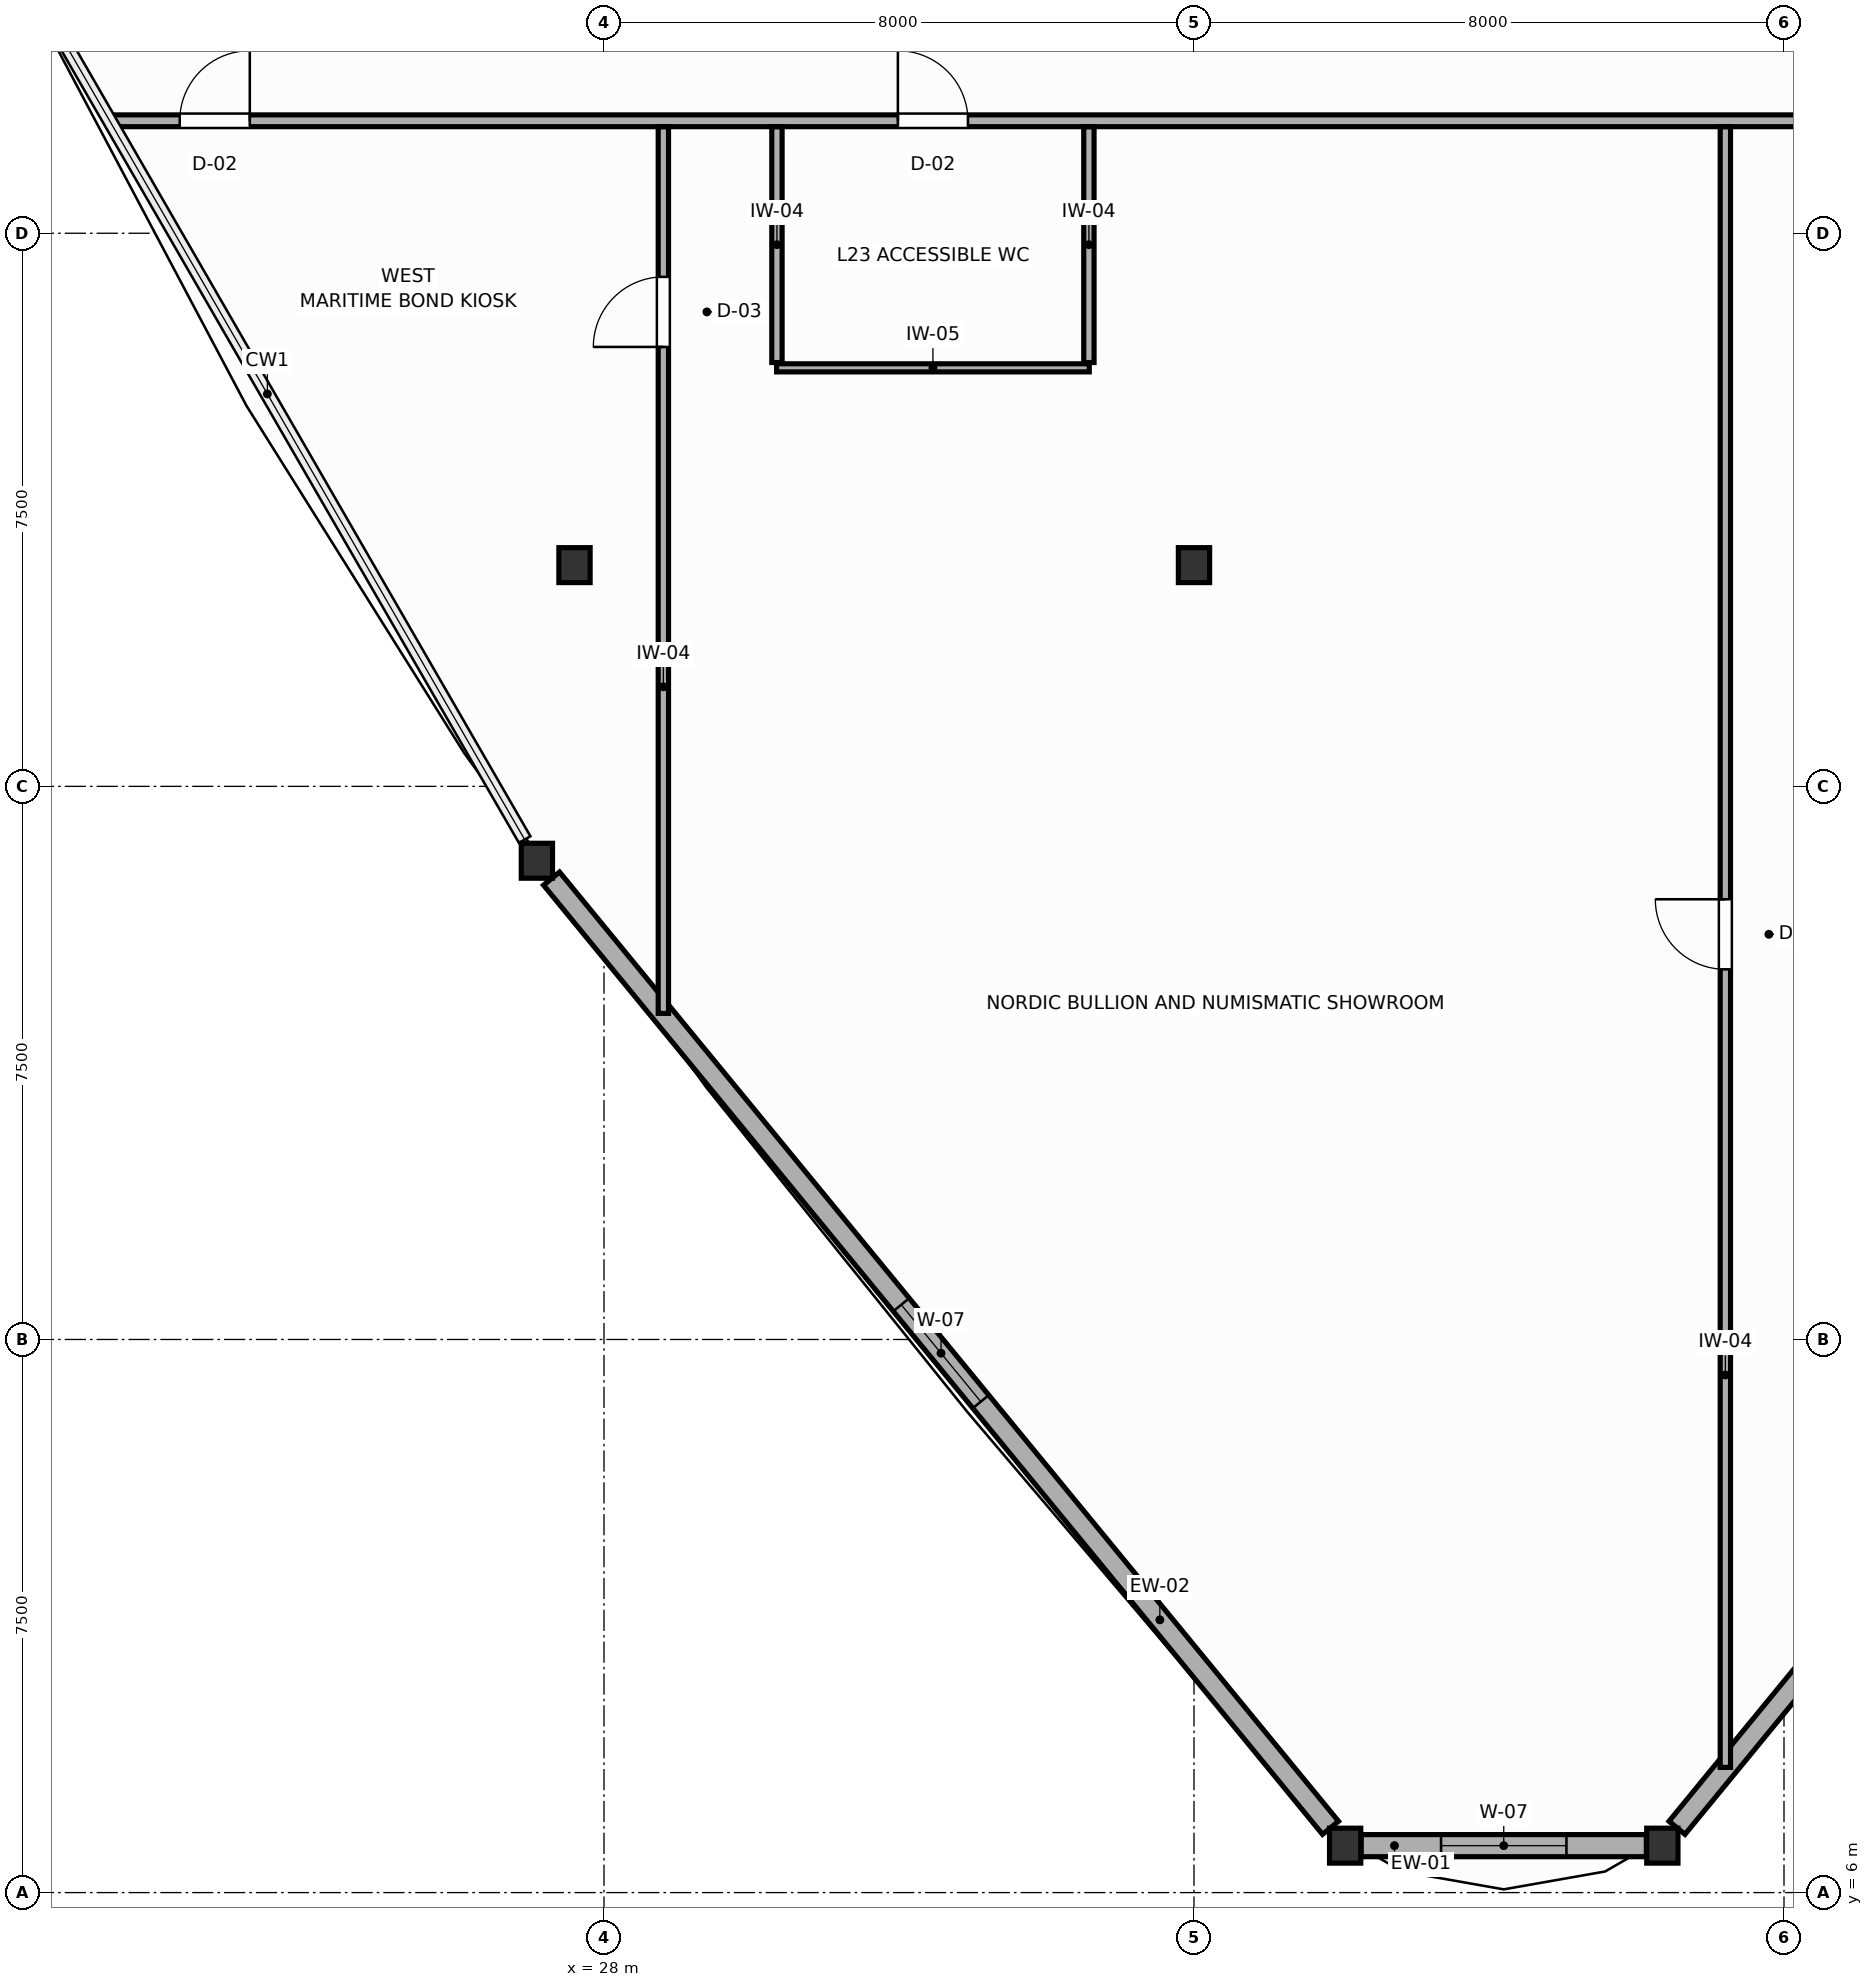
"""IFC4 building model, lengths in metres.
Left out: names, types, materials, properties, quantities, classifications, styles, units other than length and angle.
Written with IfcOpenShell. Run it as: python <this file> out.ifc"""

import sys

from ifc_helpers import new_model, si_unit, direction, frame, frame_2d, origin, origin_2d, place, context, subcontext, project, spatial, rectangle, i_section, extrude, source, transform, mapped, element, fill, save


model = new_model("IFC4")
c1 = context("Model", 3, precision=1e-05, world=origin(), true_north=direction((0.0, 1.0)))
c2 = subcontext(c1, "Body", "Model", "MODEL_VIEW")
j1 = project(units=[si_unit("LENGTHUNIT", "METRE"), si_unit("PLANEANGLEUNIT", "RADIAN")], contexts=[c1])
p1 = place(None, origin())
s1 = spatial("IfcSite", under=j1, at=p1, CompositionType="ELEMENT")
p2 = place(p1, origin())
s2 = spatial("IfcBuilding", under=s1, at=p2, CompositionType="ELEMENT")
p3 = place(p2, frame((0.0, 0.0, 95.1)))
s3 = spatial("IfcBuildingStorey", under=s2, at=p3, CompositionType="ELEMENT", Elevation=95.1)
m1 = source(origin(), c2, "Body", "SweptSolid", [
    extrude(i_section(OverallWidth=0.424, OverallDepth=0.474, WebThickness=0.045, FlangeThickness=0.072, FilletRadius=0.015, at=origin_2d()), origin(), (0.0, 0.0, 1.0), 3.9),
])
for number, where, z_axis, x_axis in (
    (1, (27.6, 24.0, 0.0), (0.0, 0.0, 1.0), (1.0, 0.0, 0.0)),
    (2, (36.0, 24.0, 0.0), (0.0, 0.0, 1.0), (1.0, 0.0, 0.0)),
    (3, (27.09, 19.991, 0.0), (0.0, 0.0, 1.0), (1.0, 0.0, 0.0)),
    (4, (38.05, 6.636, 0.0), (0.0, 0.0, 1.0), (1.0, 0.0, 0.0)),
    (5, (42.351, 6.636, 0.0), (0.0, 0.0, 1.0), (1.0, 0.0, 0.0)),
):
    element("IfcColumn", number, at=place(p3, frame(where, z_axis=z_axis, x_axis=x_axis)), inside=s3, PredefinedType="COLUMN", context=c2, shape_type="MappedRepresentation", body=[
        mapped(m1, transform((0.0, 0.0, 0.0), scale=1.0)),
    ])
p4 = place(p3, frame((27.289, 19.749, 0.0), z_axis=(0.0, 0.0, 1.0), x_axis=(0.634363798099, -0.77303465101, 0.0)))
e6 = element("IfcWall", 6, at=p4, inside=s3, PredefinedType="SOLIDWALL", context=c2, shape_type="SweptSolid", body=[
    extrude(rectangle(XDim=16.65, YDim=0.28, at=frame_2d((8.325, 0.0))), origin(), (0.0, 0.0, 1.0), 2.07),
])
p5 = place(p4, frame((7.475, 0.0, 0.75)))
e7 = element("IfcOpeningElement", 7, at=p5, cuts=e6, PredefinedType="OPENING", context=c2, shape_type="SweptSolid", body=[
    extrude(rectangle(XDim=1.7, YDim=1.1, at=frame_2d((0.85, 0.55))), frame((0.0, 0.15, 0.0), z_axis=(0.0, -1.0, 0.0), x_axis=(1.0, 0.0, 0.0)), (0.0, 0.0, 1.0), 0.3),
])
p6 = place(p3, frame((38.267, 6.636, 0.0), z_axis=(0.0, 0.0, 1.0), x_axis=(1.0, 0.0, 0.0)))
e8 = element("IfcWall", 8, at=p6, inside=s3, PredefinedType="SOLIDWALL", context=c2, shape_type="SweptSolid", body=[
    extrude(rectangle(XDim=3.867, YDim=0.3, at=frame_2d((1.934, 0.0))), origin(), (0.0, 0.0, 1.0), 2.07),
])
p7 = place(p6, frame((1.083, 0.0, 0.75)))
e9 = element("IfcOpeningElement", 9, at=p7, cuts=e8, PredefinedType="OPENING", context=c2, shape_type="SweptSolid", body=[
    extrude(rectangle(XDim=1.7, YDim=1.1, at=frame_2d((0.85, 0.55))), frame((0.0, 0.16, 0.0), z_axis=(0.0, -1.0, 0.0), x_axis=(1.0, 0.0, 0.0)), (0.0, 0.0, 1.0), 0.32),
])
p8 = place(p3, frame((42.549, 6.878, 0.0), z_axis=(0.0, 0.0, 1.0), x_axis=(0.634372560511, 0.77302746036, 0.0)))
e10 = element("IfcWall", 10, at=p8, inside=s3, PredefinedType="SOLIDWALL", context=c2, shape_type="SweptSolid", body=[
    extrude(rectangle(XDim=16.65, YDim=0.28, at=frame_2d((8.325, 0.0))), origin(), (0.0, 0.0, 1.0), 2.07),
])
p9 = place(p8, frame((7.475, 0.0, 0.75)))
e11 = element("IfcOpeningElement", 11, at=p9, cuts=e10, PredefinedType="OPENING", context=c2, shape_type="SweptSolid", body=[
    extrude(rectangle(XDim=1.7, YDim=1.1, at=frame_2d((0.85, 0.55))), frame((0.0, 0.15, 0.0), z_axis=(0.0, -1.0, 0.0), x_axis=(1.0, 0.0, 0.0)), (0.0, 0.0, 1.0), 0.3),
])
p10 = place(p3, frame((21.317, 30.025, 0.0), z_axis=(0.0, 0.0, 1.0), x_axis=(1.0, 0.0, 0.0)))
e12 = element("IfcWall", 12, at=p10, inside=s3, PredefinedType="PARTITIONING", context=c2, shape_type="SweptSolid", body=[
    extrude(rectangle(XDim=37.766, YDim=0.16, at=frame_2d((18.883, 0.0))), origin(), (0.0, 0.0, 1.0), 3.7),
])
p11 = place(p10, frame((10.668, 0.0, 0.0)))
e13 = element("IfcOpeningElement", 13, at=p11, cuts=e12, PredefinedType="OPENING", context=c2, shape_type="SweptSolid", body=[
    extrude(rectangle(XDim=0.95, YDim=2.05, at=frame_2d((0.475, 1.025))), frame((0.0, 0.09, 0.0), z_axis=(0.0, -1.0, 0.0), x_axis=(1.0, 0.0, 0.0)), (0.0, 0.0, 1.0), 0.18),
])
p12 = place(p10, frame((0.93, 0.0, 0.0)))
e14 = element("IfcOpeningElement", 14, at=p12, cuts=e12, PredefinedType="OPENING", context=c2, shape_type="SweptSolid", body=[
    extrude(rectangle(XDim=0.95, YDim=2.05, at=frame_2d((0.475, 1.025))), frame((0.0, 0.09, 0.0), z_axis=(0.0, -1.0, 0.0), x_axis=(1.0, 0.0, 0.0)), (0.0, 0.0, 1.0), 0.18),
])
p13 = place(p3, frame((43.205, 7.698, 0.0), z_axis=(0.0, 0.0, 1.0), x_axis=(0.0, 1.0, 0.0)))
e15 = element("IfcWall", 15, at=p13, inside=s3, PredefinedType="PARTITIONING", context=c2, shape_type="SweptSolid", body=[
    extrude(rectangle(XDim=22.246, YDim=0.14, at=frame_2d((11.123, 0.0))), origin(), (0.0, 0.0, 1.0), 2.23),
])
p14 = place(p13, frame((10.821, 0.0, 0.0)))
e16 = element("IfcOpeningElement", 16, at=p14, cuts=e15, PredefinedType="OPENING", context=c2, shape_type="SweptSolid", body=[
    extrude(rectangle(XDim=0.95, YDim=2.05, at=frame_2d((0.475, 1.025))), frame((0.0, 0.08, 0.0), z_axis=(0.0, -1.0, 0.0), x_axis=(1.0, 0.0, 0.0)), (0.0, 0.0, 1.0), 0.16),
])
p15 = place(p3, frame((28.805, 17.921, 0.0), z_axis=(0.0, 0.0, 1.0), x_axis=(0.0, 1.0, 0.0)))
e17 = element("IfcWall", 17, at=p15, inside=s3, PredefinedType="PARTITIONING", context=c2, shape_type="SweptSolid", body=[
    extrude(rectangle(XDim=12.022, YDim=0.14, at=frame_2d((6.011, 0.0))), origin(), (0.0, 0.0, 1.0), 3.7),
])
p16 = place(p15, frame((9.037, 0.0, 0.0)))
e18 = element("IfcOpeningElement", 18, at=p16, cuts=e17, PredefinedType="OPENING", context=c2, shape_type="SweptSolid", body=[
    extrude(rectangle(XDim=0.95, YDim=2.05, at=frame_2d((0.475, 1.025))), frame((0.0, 0.08, 0.0), z_axis=(0.0, -1.0, 0.0), x_axis=(1.0, 0.0, 0.0)), (0.0, 0.0, 1.0), 0.16),
])
p17 = place(p3, frame((30.34, 26.675, 0.0), z_axis=(0.0, 0.0, 1.0), x_axis=(1.0, 0.0, 0.0)))
e19 = element("IfcWall", 19, at=p17, inside=s3, PredefinedType="MOVABLE", context=c2, shape_type="SweptSolid", body=[
    extrude(rectangle(XDim=4.24, YDim=0.11, at=frame_2d((2.12, 0.0))), origin(), (0.0, 0.0, 1.0), 3.7),
])
for number, where, z_axis, x_axis in (
    (20, (34.575, 26.747, 0.0), (0.0, 0.0, 1.0), (0.0, 1.0, 0.0)),
    (21, (30.345, 26.747, 0.0), (0.0, 0.0, 1.0), (0.0, 1.0, 0.0)),
):
    element("IfcWall", number, at=place(p3, frame(where, z_axis=z_axis, x_axis=x_axis)), inside=s3, PredefinedType="PARTITIONING", context=c2, shape_type="SweptSolid", body=[
        extrude(rectangle(XDim=3.196, YDim=0.14, at=frame_2d((1.598, 0.0))), origin(), (0.0, 0.0, 1.0), 3.7),
    ])
p18 = place(p5, origin())
e22 = element("IfcWindow", 22, at=p18, inside=s3, PartitioningType="SINGLE_PANEL", PredefinedType="WINDOW", context=c2, shape_type="SweptSolid", body=[
    extrude(rectangle(XDim=1.7, YDim=1.1, at=frame_2d((0.85, 0.55))), frame((0.0, 0.03, 0.0), z_axis=(0.0, -1.0, 0.0), x_axis=(1.0, 0.0, 0.0)), (0.0, 0.0, 1.0), 0.06),
])
fill(e7, e22)
p19 = place(p7, origin())
e23 = element("IfcWindow", 23, at=p19, inside=s3, PartitioningType="SINGLE_PANEL", PredefinedType="WINDOW", context=c2, shape_type="SweptSolid", body=[
    extrude(rectangle(XDim=1.7, YDim=1.1, at=frame_2d((0.85, 0.55))), frame((0.0, 0.03, 0.0), z_axis=(0.0, -1.0, 0.0), x_axis=(1.0, 0.0, 0.0)), (0.0, 0.0, 1.0), 0.06),
])
fill(e9, e23)
p20 = place(p11, origin())
e24 = element("IfcDoor", 24, at=p20, inside=s3, OperationType="SINGLE_SWING_LEFT", PredefinedType="DOOR", context=c2, shape_type="SweptSolid", body=[
    extrude(rectangle(XDim=0.95, YDim=2.05, at=frame_2d((0.475, 1.025))), frame((0.0, 0.025, 0.0), z_axis=(0.0, -1.0, 0.0), x_axis=(1.0, 0.0, 0.0)), (0.0, 0.0, 1.0), 0.05),
])
fill(e13, e24)
p21 = place(p12, origin())
e25 = element("IfcDoor", 25, at=p21, inside=s3, OperationType="SINGLE_SWING_RIGHT", PredefinedType="DOOR", context=c2, shape_type="SweptSolid", body=[
    extrude(rectangle(XDim=0.95, YDim=2.05, at=frame_2d((0.475, 1.025))), frame((0.0, 0.025, 0.0), z_axis=(0.0, -1.0, 0.0), x_axis=(1.0, 0.0, 0.0)), (0.0, 0.0, 1.0), 0.05),
])
fill(e14, e25)
p22 = place(p14, origin())
e26 = element("IfcDoor", 26, at=p22, inside=s3, OperationType="SINGLE_SWING_RIGHT", PredefinedType="DOOR", context=c2, shape_type="SweptSolid", body=[
    extrude(rectangle(XDim=0.95, YDim=2.05, at=frame_2d((0.475, 1.025))), frame((0.0, 0.025, 0.0), z_axis=(0.0, -1.0, 0.0), x_axis=(1.0, 0.0, 0.0)), (0.0, 0.0, 1.0), 0.05),
])
fill(e16, e26)
p23 = place(p16, origin())
e27 = element("IfcDoor", 27, at=p23, inside=s3, OperationType="SINGLE_SWING_LEFT", PredefinedType="DOOR", context=c2, shape_type="SweptSolid", body=[
    extrude(rectangle(XDim=0.95, YDim=2.05, at=frame_2d((0.475, 1.025))), frame((0.0, 0.025, 0.0), z_axis=(0.0, -1.0, 0.0), x_axis=(1.0, 0.0, 0.0)), (0.0, 0.0, 1.0), 0.05),
])
fill(e18, e27)
save(model, sys.argv[1])
